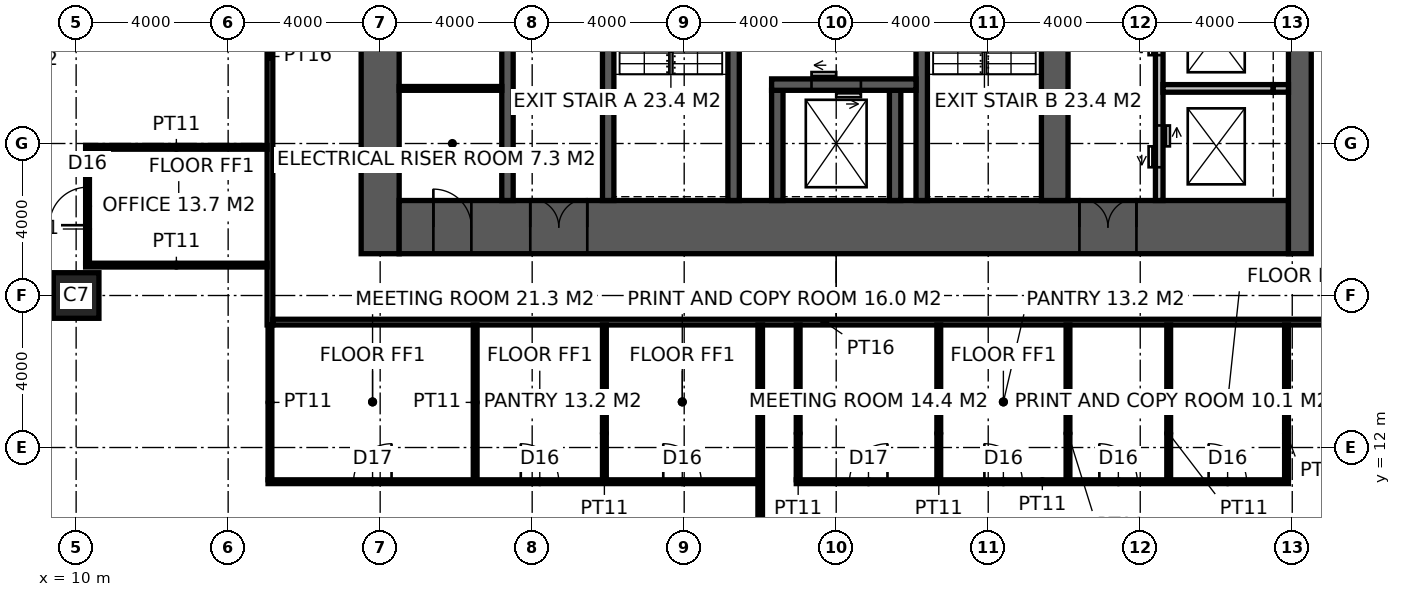
"""IFC4 building model, lengths in metres.
Left out: names, types, materials, properties, quantities, classifications, styles, units other than length and angle.
Written with IfcOpenShell. Run it as: python <this file> out.ifc"""

import sys

from ifc_helpers import new_model, si_unit, direction, frame, frame_2d, origin, origin_2d, place, context, subcontext, project, spatial, rectangle, hollow_rectangle, extrude, element, fill, save


model = new_model("IFC4")
c1 = context("Model", 3, precision=1e-05, world=origin(), true_north=direction((0.0, 1.0)))
c2 = subcontext(c1, "Body", "Model", "MODEL_VIEW")
j1 = project(units=[si_unit("LENGTHUNIT", "METRE"), si_unit("PLANEANGLEUNIT", "RADIAN")], contexts=[c1])
p1 = place(None, origin())
s1 = spatial("IfcSite", under=j1, at=p1, CompositionType="ELEMENT")
p2 = place(p1, origin())
s2 = spatial("IfcBuilding", under=s1, at=p2, CompositionType="ELEMENT")
p3 = place(p2, frame((0.0, 0.0, 47.0)))
s3 = spatial("IfcBuildingStorey", under=s2, at=p3, CompositionType="ELEMENT", Elevation=47.0)
p4 = place(p3, frame((10.0, 16.0, 0.0), z_axis=(0.0, 0.0, 1.0), x_axis=(1.0, 0.0, 0.0)))
e1 = element("IfcColumn", 1, at=p4, inside=s3, PredefinedType="COLUMN", context=c2, shape_type="SweptSolid", body=[
    extrude(hollow_rectangle(XDim=1.2, YDim=1.2, WallThickness=0.1, at=origin_2d()), origin(), (0.0, 0.0, 1.0), 4.0),
])
p5 = place(p3, frame((18.0, 17.1, -0.15), z_axis=(0.0, 0.0, 1.0), x_axis=(0.0, 1.0, 0.0)))
e2 = element("IfcWall", 2, at=p5, inside=s3, PredefinedType="SHEAR", context=c2, shape_type="SweptSolid", body=[
    extrude(rectangle(XDim=19.8, YDim=1.0, at=frame_2d((9.9, 0.0))), origin(), (0.0, 0.0, 1.0), 4.0),
])
p6 = place(p3, frame((18.5, 17.8, -0.15), z_axis=(0.0, 0.0, 1.0), x_axis=(1.0, 0.0, 0.0)))
e3 = element("IfcWall", 3, at=p6, inside=s3, PredefinedType="SHEAR", context=c2, shape_type="SweptSolid", body=[
    extrude(rectangle(XDim=23.4, YDim=1.4, at=frame_2d((11.7, 0.0))), origin(), (0.0, 0.0, 1.0), 4.0),
])
p7 = place(p6, frame((3.45, 0.0, 0.15)))
e4 = element("IfcOpeningElement", 4, at=p7, cuts=e3, PredefinedType="OPENING", context=c2, shape_type="SweptSolid", body=[
    extrude(rectangle(XDim=1.5, YDim=2.4, at=frame_2d((0.75, 1.2))), frame((0.0, 0.71, 0.0), z_axis=(0.0, -1.0, 0.0), x_axis=(1.0, 0.0, 0.0)), (0.0, 0.0, 1.0), 1.42),
])
p8 = place(p6, frame((17.9, 0.0, 0.15)))
e5 = element("IfcOpeningElement", 5, at=p8, cuts=e3, PredefinedType="OPENING", context=c2, shape_type="SweptSolid", body=[
    extrude(rectangle(XDim=1.5, YDim=2.4, at=frame_2d((0.75, 1.2))), frame((0.0, 0.71, 0.0), z_axis=(0.0, -1.0, 0.0), x_axis=(1.0, 0.0, 0.0)), (0.0, 0.0, 1.0), 1.42),
])
p9 = place(p6, frame((0.9, 0.0, 0.15)))
e6 = element("IfcOpeningElement", 6, at=p9, cuts=e3, PredefinedType="OPENING", context=c2, shape_type="SweptSolid", body=[
    extrude(rectangle(XDim=1.0, YDim=2.2, at=frame_2d((0.5, 1.1))), frame((0.0, 0.71, 0.0), z_axis=(0.0, -1.0, 0.0), x_axis=(1.0, 0.0, 0.0)), (0.0, 0.0, 1.0), 1.42),
])
p10 = place(p3, frame((42.2, 17.1, -0.15), z_axis=(0.0, 0.0, 1.0), x_axis=(0.0, 1.0, 0.0)))
e7 = element("IfcWall", 7, at=p10, inside=s3, PredefinedType="SHEAR", context=c2, shape_type="SweptSolid", body=[
    extrude(rectangle(XDim=19.8, YDim=0.6, at=frame_2d((9.9, 0.0))), origin(), (0.0, 0.0, 1.0), 4.0),
])
p11 = place(p3, frame((35.75, 18.5, -0.15), z_axis=(0.0, 0.0, 1.0), x_axis=(0.0, 1.0, 0.0)))
e8 = element("IfcWall", 8, at=p11, inside=s3, PredefinedType="SHEAR", context=c2, shape_type="SweptSolid", body=[
    extrude(rectangle(XDim=17.0, YDim=0.7, at=frame_2d((8.5, 0.0))), origin(), (0.0, 0.0, 1.0), 4.0),
])
p12 = place(p11, frame((9.85, 0.0, 0.15)))
e9 = element("IfcOpeningElement", 9, at=p12, cuts=e8, PredefinedType="OPENING", context=c2, shape_type="SweptSolid", body=[
    extrude(rectangle(XDim=1.0, YDim=2.2, at=frame_2d((0.5, 1.1))), frame((0.0, 0.36, 0.0), z_axis=(0.0, -1.0, 0.0), x_axis=(1.0, 0.0, 0.0)), (0.0, 0.0, 1.0), 0.72),
])
p13 = place(p3, frame((24.0, 18.5, -0.15), z_axis=(0.0, 0.0, 1.0), x_axis=(0.0, 1.0, 0.0)))
e10 = element("IfcWall", 10, at=p13, inside=s3, PredefinedType="SHEAR", context=c2, shape_type="SweptSolid", body=[
    extrude(rectangle(XDim=17.0, YDim=0.3, at=frame_2d((8.5, 0.0))), origin(), (0.0, 0.0, 1.0), 4.0),
])
p14 = place(p13, frame((9.6, 0.0, 0.15)))
e11 = element("IfcOpeningElement", 11, at=p14, cuts=e10, PredefinedType="OPENING", context=c2, shape_type="SweptSolid", body=[
    extrude(rectangle(XDim=1.5, YDim=2.4, at=frame_2d((0.75, 1.2))), frame((0.0, 0.16, 0.0), z_axis=(0.0, -1.0, 0.0), x_axis=(1.0, 0.0, 0.0)), (0.0, 0.0, 1.0), 0.32),
])
p15 = place(p3, frame((27.3, 18.5, -0.15), z_axis=(0.0, 0.0, 1.0), x_axis=(0.0, 1.0, 0.0)))
e12 = element("IfcWall", 12, at=p15, inside=s3, PredefinedType="SHEAR", context=c2, shape_type="SweptSolid", body=[
    extrude(rectangle(XDim=7.9, YDim=0.3, at=frame_2d((3.95, 0.0))), origin(), (0.0, 0.0, 1.0), 4.0),
])
p16 = place(p15, frame((6.4, 0.0, 0.15)))
e13 = element("IfcOpeningElement", 13, at=p16, cuts=e12, PredefinedType="OPENING", context=c2, shape_type="SweptSolid", body=[
    extrude(rectangle(XDim=1.0, YDim=2.2, at=frame_2d((0.5, 1.1))), frame((0.0, 0.16, 0.0), z_axis=(0.0, -1.0, 0.0), x_axis=(1.0, 0.0, 0.0)), (0.0, 0.0, 1.0), 0.32),
])
p17 = place(p3, frame((32.25, 18.5, -0.15), z_axis=(0.0, 0.0, 1.0), x_axis=(0.0, 1.0, 0.0)))
e14 = element("IfcWall", 14, at=p17, inside=s3, PredefinedType="SHEAR", context=c2, shape_type="SweptSolid", body=[
    extrude(rectangle(XDim=7.9, YDim=0.3, at=frame_2d((3.95, 0.0))), origin(), (0.0, 0.0, 1.0), 4.0),
])
for number, where, z_axis, x_axis in (
    (15, (28.45, 18.5, -0.15), (0.0, 0.0, 1.0), (0.0, 1.0, 0.0)),
    (16, (31.55, 18.5, -0.15), (0.0, 0.0, 1.0), (0.0, 1.0, 0.0)),
):
    element("IfcWall", number, at=place(p3, frame(where, z_axis=z_axis, x_axis=x_axis)), inside=s3, PredefinedType="SHEAR", context=c2, shape_type="SweptSolid", body=[
        extrude(rectangle(XDim=2.9, YDim=0.3, at=frame_2d((1.45, 0.0))), origin(), (0.0, 0.0, 1.0), 4.0),
    ])
p18 = place(p3, frame((28.3, 21.55, -0.15), z_axis=(0.0, 0.0, 1.0), x_axis=(1.0, 0.0, 0.0)))
e17 = element("IfcWall", 17, at=p18, inside=s3, PredefinedType="SHEAR", context=c2, shape_type="SweptSolid", body=[
    extrude(rectangle(XDim=3.8, YDim=0.3, at=frame_2d((1.9, 0.0))), origin(), (0.0, 0.0, 1.0), 4.0),
])
p19 = place(p18, frame((1.05, 0.0, 0.15)))
e18 = element("IfcOpeningElement", 18, at=p19, cuts=e17, PredefinedType="OPENING", context=c2, shape_type="SweptSolid", body=[
    extrude(rectangle(XDim=1.3, YDim=2.4, at=frame_2d((0.65, 1.2))), frame((0.0, 0.16, 0.0), z_axis=(0.0, -1.0, 0.0), x_axis=(1.0, 0.0, 0.0)), (0.0, 0.0, 1.0), 0.32),
])
p20 = place(p3, frame((21.35, 18.5, -0.15), z_axis=(0.0, 0.0, 1.0), x_axis=(0.0, 1.0, 0.0)))
e19 = element("IfcWall", 19, at=p20, inside=s3, PredefinedType="SHEAR", context=c2, shape_type="SweptSolid", body=[
    extrude(rectangle(XDim=12.5, YDim=0.3, at=frame_2d((6.25, 0.0))), origin(), (0.0, 0.0, 1.0), 4.0),
])
p21 = place(p20, frame((6.725, 0.0, 0.15)))
e20 = element("IfcOpeningElement", 20, at=p21, cuts=e19, PredefinedType="OPENING", context=c2, shape_type="SweptSolid", body=[
    extrude(rectangle(XDim=1.0, YDim=2.2, at=frame_2d((0.5, 1.1))), frame((0.0, 0.16, 0.0), z_axis=(0.0, -1.0, 0.0), x_axis=(1.0, 0.0, 0.0)), (0.0, 0.0, 1.0), 0.32),
])
p22 = place(p3, frame((38.5, 18.5, -0.15), z_axis=(0.0, 0.0, 1.0), x_axis=(0.0, 1.0, 0.0)))
e21 = element("IfcWall", 21, at=p22, inside=s3, PredefinedType="SOLIDWALL", context=c2, shape_type="SweptSolid", body=[
    extrude(rectangle(XDim=11.5, YDim=0.2, at=frame_2d((5.75, 0.0))), origin(), (0.0, 0.0, 1.0), 4.0),
])
p23 = place(p22, frame((0.875, 0.0, 0.15)))
e22 = element("IfcOpeningElement", 22, at=p23, cuts=e21, PredefinedType="OPENING", context=c2, shape_type="SweptSolid", body=[
    extrude(rectangle(XDim=1.1, YDim=2.2, at=frame_2d((0.55, 1.1))), frame((0.0, 0.11, 0.0), z_axis=(0.0, -1.0, 0.0), x_axis=(1.0, 0.0, 0.0)), (0.0, 0.0, 1.0), 0.22),
])
p24 = place(p22, frame((3.825, 0.0, 0.15)))
e23 = element("IfcOpeningElement", 23, at=p24, cuts=e21, PredefinedType="OPENING", context=c2, shape_type="SweptSolid", body=[
    extrude(rectangle(XDim=1.1, YDim=2.2, at=frame_2d((0.55, 1.1))), frame((0.0, 0.11, 0.0), z_axis=(0.0, -1.0, 0.0), x_axis=(1.0, 0.0, 0.0)), (0.0, 0.0, 1.0), 0.22),
])
p25 = place(p22, frame((6.675, 0.0, 0.15)))
e24 = element("IfcOpeningElement", 24, at=p25, cuts=e21, PredefinedType="OPENING", context=c2, shape_type="SweptSolid", body=[
    extrude(rectangle(XDim=1.1, YDim=2.2, at=frame_2d((0.55, 1.1))), frame((0.0, 0.11, 0.0), z_axis=(0.0, -1.0, 0.0), x_axis=(1.0, 0.0, 0.0)), (0.0, 0.0, 1.0), 0.22),
])
p26 = place(p22, frame((9.575, 0.0, 0.15)))
e25 = element("IfcOpeningElement", 25, at=p26, cuts=e21, PredefinedType="OPENING", context=c2, shape_type="SweptSolid", body=[
    extrude(rectangle(XDim=1.1, YDim=2.2, at=frame_2d((0.55, 1.1))), frame((0.0, 0.11, 0.0), z_axis=(0.0, -1.0, 0.0), x_axis=(1.0, 0.0, 0.0)), (0.0, 0.0, 1.0), 0.22),
])
p27 = place(p3, frame((38.6, 21.45, -0.15), z_axis=(0.0, 0.0, 1.0), x_axis=(1.0, 0.0, 0.0)))
e26 = element("IfcWall", 26, at=p27, inside=s3, PredefinedType="SOLIDWALL", context=c2, shape_type="SweptSolid", body=[
    extrude(rectangle(XDim=2.9, YDim=0.2, at=frame_2d((1.45, 0.0))), origin(), (0.0, 0.0, 1.0), 4.0),
])
p28 = place(p3, frame((41.5, 21.45, -0.15), z_axis=(0.0, 0.0, 1.0), x_axis=(1.0, 0.0, 0.0)))
e27 = element("IfcWall", 27, at=p28, inside=s3, PredefinedType="SOLIDWALL", context=c2, shape_type="SweptSolid", body=[
    extrude(rectangle(XDim=0.4, YDim=0.2, at=frame_2d((0.2, 0.0))), origin(), (0.0, 0.0, 1.0), 4.0),
])
p29 = place(p3, frame((18.5, 21.45, 0.0), z_axis=(0.0, 0.0, 1.0), x_axis=(1.0, 0.0, 0.0)))
e28 = element("IfcWall", 28, at=p29, inside=s3, PredefinedType="PARTITIONING", context=c2, shape_type="SweptSolid", body=[
    extrude(rectangle(XDim=2.7, YDim=0.1, at=frame_2d((1.35, 0.0))), origin(), (0.0, 0.0, 1.0), 3.85),
])
p30 = place(p3, frame((15.1, 15.225, 0.0), z_axis=(0.0, 0.0, 1.0), x_axis=(0.0, 1.0, 0.0)))
e29 = element("IfcWall", 29, at=p30, inside=s3, PredefinedType="PARTITIONING", context=c2, shape_type="SweptSolid", body=[
    extrude(rectangle(XDim=23.55, YDim=0.15, at=frame_2d((11.775, 0.0))), origin(), (0.0, 0.0, 1.0), 3.85),
])
p31 = place(p30, frame((10.875, 0.0, 0.0)))
e30 = element("IfcOpeningElement", 30, at=p31, cuts=e29, PredefinedType="OPENING", context=c2, shape_type="SweptSolid", body=[
    extrude(rectangle(XDim=1.8, YDim=2.4, at=frame_2d((0.9, 1.2))), frame((0.0, 0.085, 0.0), z_axis=(0.0, -1.0, 0.0), x_axis=(1.0, 0.0, 0.0)), (0.0, 0.0, 1.0), 0.17),
])
p32 = place(p3, frame((15.175, 15.3, 0.0), z_axis=(0.0, 0.0, 1.0), x_axis=(1.0, 0.0, 0.0)))
e31 = element("IfcWall", 31, at=p32, inside=s3, PredefinedType="PARTITIONING", context=c2, shape_type="SweptSolid", body=[
    extrude(rectangle(XDim=29.05, YDim=0.15, at=frame_2d((14.525, 0.0))), origin(), (0.0, 0.0, 1.0), 3.85),
])
p33 = place(p3, frame((28.0, 0.3, 0.0), z_axis=(0.0, 0.0, 1.0), x_axis=(0.0, 1.0, 0.0)))
e32 = element("IfcWall", 32, at=p33, inside=s3, PredefinedType="PARTITIONING", context=c2, shape_type="SweptSolid", body=[
    extrude(rectangle(XDim=14.925, YDim=0.12, at=frame_2d((7.462, 0.0))), origin(), (0.0, 0.0, 1.0), 3.85),
])
p34 = place(p3, frame((15.05, 11.1, 0.0), z_axis=(0.0, 0.0, 1.0), x_axis=(1.0, 0.0, 0.0)))
e33 = element("IfcWall", 33, at=p34, inside=s3, PredefinedType="PARTITIONING", context=c2, shape_type="SweptSolid", body=[
    extrude(rectangle(XDim=12.889, YDim=0.1, at=frame_2d((6.444, 0.0))), origin(), (0.0, 0.0, 1.0), 3.85),
])
p35 = place(p34, frame((2.25, 0.0, 0.0)))
e34 = element("IfcOpeningElement", 34, at=p35, cuts=e33, PredefinedType="OPENING", context=c2, shape_type="SweptSolid", body=[
    extrude(rectangle(XDim=1.0, YDim=2.2, at=frame_2d((0.5, 1.1))), frame((0.0, 0.06, 0.0), z_axis=(0.0, -1.0, 0.0), x_axis=(1.0, 0.0, 0.0)), (0.0, 0.0, 1.0), 0.12),
])
p36 = place(p34, frame((6.65, 0.0, 0.0)))
e35 = element("IfcOpeningElement", 35, at=p36, cuts=e33, PredefinedType="OPENING", context=c2, shape_type="SweptSolid", body=[
    extrude(rectangle(XDim=1.0, YDim=2.2, at=frame_2d((0.5, 1.1))), frame((0.0, 0.06, 0.0), z_axis=(0.0, -1.0, 0.0), x_axis=(1.0, 0.0, 0.0)), (0.0, 0.0, 1.0), 0.12),
])
p37 = place(p34, frame((10.399, 0.0, 0.0)))
e36 = element("IfcOpeningElement", 36, at=p37, cuts=e33, PredefinedType="OPENING", context=c2, shape_type="SweptSolid", body=[
    extrude(rectangle(XDim=1.0, YDim=2.2, at=frame_2d((0.5, 1.1))), frame((0.0, 0.06, 0.0), z_axis=(0.0, -1.0, 0.0), x_axis=(1.0, 0.0, 0.0)), (0.0, 0.0, 1.0), 0.12),
])
p38 = place(p3, frame((28.949, 11.1, 0.0), z_axis=(0.0, 0.0, 1.0), x_axis=(1.0, 0.0, 0.0)))
e37 = element("IfcWall", 37, at=p38, inside=s3, PredefinedType="PARTITIONING", context=c2, shape_type="SweptSolid", body=[
    extrude(rectangle(XDim=12.95, YDim=0.1, at=frame_2d((6.475, 0.0))), origin(), (0.0, 0.0, 1.0), 3.85),
])
p39 = place(p38, frame((1.4, 0.0, 0.0)))
e38 = element("IfcOpeningElement", 38, at=p39, cuts=e37, PredefinedType="OPENING", context=c2, shape_type="SweptSolid", body=[
    extrude(rectangle(XDim=1.0, YDim=2.2, at=frame_2d((0.5, 1.1))), frame((0.0, 0.06, 0.0), z_axis=(0.0, -1.0, 0.0), x_axis=(1.0, 0.0, 0.0)), (0.0, 0.0, 1.0), 0.12),
])
p40 = place(p38, frame((4.95, 0.0, 0.0)))
e39 = element("IfcOpeningElement", 39, at=p40, cuts=e37, PredefinedType="OPENING", context=c2, shape_type="SweptSolid", body=[
    extrude(rectangle(XDim=1.0, YDim=2.2, at=frame_2d((0.5, 1.1))), frame((0.0, 0.06, 0.0), z_axis=(0.0, -1.0, 0.0), x_axis=(1.0, 0.0, 0.0)), (0.0, 0.0, 1.0), 0.12),
])
p41 = place(p38, frame((7.975, 0.0, 0.0)))
e40 = element("IfcOpeningElement", 40, at=p41, cuts=e37, PredefinedType="OPENING", context=c2, shape_type="SweptSolid", body=[
    extrude(rectangle(XDim=1.0, YDim=2.2, at=frame_2d((0.5, 1.1))), frame((0.0, 0.06, 0.0), z_axis=(0.0, -1.0, 0.0), x_axis=(1.0, 0.0, 0.0)), (0.0, 0.0, 1.0), 0.12),
])
p42 = place(p38, frame((10.85, 0.0, 0.0)))
e41 = element("IfcOpeningElement", 41, at=p42, cuts=e37, PredefinedType="OPENING", context=c2, shape_type="SweptSolid", body=[
    extrude(rectangle(XDim=1.0, YDim=2.2, at=frame_2d((0.5, 1.1))), frame((0.0, 0.06, 0.0), z_axis=(0.0, -1.0, 0.0), x_axis=(1.0, 0.0, 0.0)), (0.0, 0.0, 1.0), 0.12),
])
p43 = place(p3, frame((10.25, 16.8, 0.0), z_axis=(0.0, 0.0, 1.0), x_axis=(1.0, 0.0, 0.0)))
e42 = element("IfcWall", 42, at=p43, inside=s3, PredefinedType="PARTITIONING", context=c2, shape_type="SweptSolid", body=[
    extrude(rectangle(XDim=4.775, YDim=0.1, at=frame_2d((2.387, 0.0))), origin(), (0.0, 0.0, 1.0), 3.85),
])
p44 = place(p3, frame((10.25, 19.9, 0.0), z_axis=(0.0, 0.0, 1.0), x_axis=(1.0, 0.0, 0.0)))
e43 = element("IfcWall", 43, at=p44, inside=s3, PredefinedType="PARTITIONING", context=c2, shape_type="SweptSolid", body=[
    extrude(rectangle(XDim=4.775, YDim=0.1, at=frame_2d((2.387, 0.0))), origin(), (0.0, 0.0, 1.0), 2.85),
])
p45 = place(p3, frame((10.3, 16.85, 0.0), z_axis=(0.0, 0.0, 1.0), x_axis=(0.0, 1.0, 0.0)))
e44 = element("IfcWall", 44, at=p45, inside=s3, PredefinedType="PARTITIONING", context=c2, shape_type="SweptSolid", body=[
    extrude(rectangle(XDim=3.0, YDim=0.1, at=frame_2d((1.5, 0.0))), origin(), (0.0, 0.0, 1.0), 2.95),
])
p46 = place(p45, frame((1.0, 0.0, 0.0)))
e45 = element("IfcOpeningElement", 45, at=p46, cuts=e44, PredefinedType="OPENING", context=c2, shape_type="SweptSolid", body=[
    extrude(rectangle(XDim=1.0, YDim=2.2, at=frame_2d((0.5, 1.1))), frame((0.0, 0.06, 0.0), z_axis=(0.0, -1.0, 0.0), x_axis=(1.0, 0.0, 0.0)), (0.0, 0.0, 1.0), 0.12),
])
for number, where, z_axis, x_axis in (
    (46, (15.1, 11.15, 0.0), (0.0, 0.0, 1.0), (0.0, 1.0, 0.0)),
    (47, (20.5, 11.15, 0.0), (0.0, 0.0, 1.0), (0.0, 1.0, 0.0)),
    (48, (23.9, 11.15, 0.0), (0.0, 0.0, 1.0), (0.0, 1.0, 0.0)),
    (49, (28.999, 11.15, 0.0), (0.0, 0.0, 1.0), (0.0, 1.0, 0.0)),
    (50, (32.699, 11.15, 0.0), (0.0, 0.0, 1.0), (0.0, 1.0, 0.0)),
    (51, (36.099, 11.15, 0.0), (0.0, 0.0, 1.0), (0.0, 1.0, 0.0)),
    (52, (38.749, 11.15, 0.0), (0.0, 0.0, 1.0), (0.0, 1.0, 0.0)),
):
    element("IfcWall", number, at=place(p3, frame(where, z_axis=z_axis, x_axis=x_axis)), inside=s3, PredefinedType="PARTITIONING", context=c2, shape_type="SweptSolid", body=[
        extrude(rectangle(XDim=4.075, YDim=0.1, at=frame_2d((2.038, 0.0))), origin(), (0.0, 0.0, 1.0), 3.85),
    ])
p47 = place(p3, frame((41.849, 11.15, 0.0), z_axis=(0.0, 0.0, 1.0), x_axis=(0.0, 1.0, 0.0)))
e53 = element("IfcWall", 53, at=p47, inside=s3, PredefinedType="PARTITIONING", context=c2, shape_type="SweptSolid", body=[
    extrude(rectangle(XDim=4.075, YDim=0.1, at=frame_2d((2.038, 0.0))), origin(), (0.0, 0.0, 1.0), 2.95),
])
p48 = place(p7, origin())
e54 = element("IfcDoor", 54, at=p48, inside=s3, OperationType="DOUBLE_DOOR_DOUBLE_SWING", PredefinedType="DOOR", context=c2, shape_type="SweptSolid", body=[
    extrude(rectangle(XDim=1.5, YDim=2.4, at=frame_2d((0.75, 1.2))), frame((0.0, 0.025, 0.0), z_axis=(0.0, -1.0, 0.0), x_axis=(1.0, 0.0, 0.0)), (0.0, 0.0, 1.0), 0.05),
])
fill(e4, e54)
p49 = place(p8, origin())
e55 = element("IfcDoor", 55, at=p49, inside=s3, OperationType="DOUBLE_DOOR_DOUBLE_SWING", PredefinedType="DOOR", context=c2, shape_type="SweptSolid", body=[
    extrude(rectangle(XDim=1.5, YDim=2.4, at=frame_2d((0.75, 1.2))), frame((0.0, 0.025, 0.0), z_axis=(0.0, -1.0, 0.0), x_axis=(1.0, 0.0, 0.0)), (0.0, 0.0, 1.0), 0.05),
])
fill(e5, e55)
p50 = place(p9, origin())
e56 = element("IfcDoor", 56, at=p50, inside=s3, OperationType="SINGLE_SWING_LEFT", PredefinedType="DOOR", context=c2, shape_type="SweptSolid", body=[
    extrude(rectangle(XDim=1.0, YDim=2.2, at=frame_2d((0.5, 1.1))), frame((0.0, 0.025, 0.0), z_axis=(0.0, -1.0, 0.0), x_axis=(1.0, 0.0, 0.0)), (0.0, 0.0, 1.0), 0.05),
])
fill(e6, e56)
p51 = place(p35, origin())
e57 = element("IfcDoor", 57, at=p51, inside=s3, OperationType="SINGLE_SWING_RIGHT", PredefinedType="DOOR", context=c2, shape_type="SweptSolid", body=[
    extrude(rectangle(XDim=1.0, YDim=2.2, at=frame_2d((0.5, 1.1))), frame((0.0, 0.025, 0.0), z_axis=(0.0, -1.0, 0.0), x_axis=(1.0, 0.0, 0.0)), (0.0, 0.0, 1.0), 0.05),
])
fill(e34, e57)
p52 = place(p36, origin())
e58 = element("IfcDoor", 58, at=p52, inside=s3, OperationType="SINGLE_SWING_LEFT", PredefinedType="DOOR", context=c2, shape_type="SweptSolid", body=[
    extrude(rectangle(XDim=1.0, YDim=2.2, at=frame_2d((0.5, 1.1))), frame((0.0, 0.025, 0.0), z_axis=(0.0, -1.0, 0.0), x_axis=(1.0, 0.0, 0.0)), (0.0, 0.0, 1.0), 0.05),
])
fill(e35, e58)
p53 = place(p37, origin())
e59 = element("IfcDoor", 59, at=p53, inside=s3, OperationType="SINGLE_SWING_LEFT", PredefinedType="DOOR", context=c2, shape_type="SweptSolid", body=[
    extrude(rectangle(XDim=1.0, YDim=2.2, at=frame_2d((0.5, 1.1))), frame((0.0, 0.025, 0.0), z_axis=(0.0, -1.0, 0.0), x_axis=(1.0, 0.0, 0.0)), (0.0, 0.0, 1.0), 0.05),
])
fill(e36, e59)
p54 = place(p39, origin())
e60 = element("IfcDoor", 60, at=p54, inside=s3, OperationType="SINGLE_SWING_RIGHT", PredefinedType="DOOR", context=c2, shape_type="SweptSolid", body=[
    extrude(rectangle(XDim=1.0, YDim=2.2, at=frame_2d((0.5, 1.1))), frame((0.0, 0.025, 0.0), z_axis=(0.0, -1.0, 0.0), x_axis=(1.0, 0.0, 0.0)), (0.0, 0.0, 1.0), 0.05),
])
fill(e38, e60)
p55 = place(p40, origin())
e61 = element("IfcDoor", 61, at=p55, inside=s3, OperationType="SINGLE_SWING_LEFT", PredefinedType="DOOR", context=c2, shape_type="SweptSolid", body=[
    extrude(rectangle(XDim=1.0, YDim=2.2, at=frame_2d((0.5, 1.1))), frame((0.0, 0.025, 0.0), z_axis=(0.0, -1.0, 0.0), x_axis=(1.0, 0.0, 0.0)), (0.0, 0.0, 1.0), 0.05),
])
fill(e39, e61)
p56 = place(p41, origin())
e62 = element("IfcDoor", 62, at=p56, inside=s3, OperationType="SINGLE_SWING_LEFT", PredefinedType="DOOR", context=c2, shape_type="SweptSolid", body=[
    extrude(rectangle(XDim=1.0, YDim=2.2, at=frame_2d((0.5, 1.1))), frame((0.0, 0.025, 0.0), z_axis=(0.0, -1.0, 0.0), x_axis=(1.0, 0.0, 0.0)), (0.0, 0.0, 1.0), 0.05),
])
fill(e40, e62)
p57 = place(p42, origin())
e63 = element("IfcDoor", 63, at=p57, inside=s3, OperationType="SINGLE_SWING_LEFT", PredefinedType="DOOR", context=c2, shape_type="SweptSolid", body=[
    extrude(rectangle(XDim=1.0, YDim=2.2, at=frame_2d((0.5, 1.1))), frame((0.0, 0.025, 0.0), z_axis=(0.0, -1.0, 0.0), x_axis=(1.0, 0.0, 0.0)), (0.0, 0.0, 1.0), 0.05),
])
fill(e41, e63)
p58 = place(p46, origin())
e64 = element("IfcDoor", 64, at=p58, inside=s3, OperationType="SINGLE_SWING_LEFT", PredefinedType="DOOR", context=c2, shape_type="SweptSolid", body=[
    extrude(rectangle(XDim=1.0, YDim=2.2, at=frame_2d((0.5, 1.1))), frame((0.0, 0.025, 0.0), z_axis=(0.0, -1.0, 0.0), x_axis=(1.0, 0.0, 0.0)), (0.0, 0.0, 1.0), 0.05),
])
fill(e45, e64)
p59 = place(p19, origin())
e65 = element("IfcDoor", 65, at=p59, inside=s3, OperationType="DOUBLE_DOOR_SLIDING", PredefinedType="DOOR", context=c2, shape_type="SweptSolid", body=[
    extrude(rectangle(XDim=1.3, YDim=2.4, at=frame_2d((0.65, 1.2))), frame((0.0, 0.025, 0.0), z_axis=(0.0, -1.0, 0.0), x_axis=(1.0, 0.0, 0.0)), (0.0, 0.0, 1.0), 0.05),
])
fill(e18, e65)
p60 = place(p23, origin())
e66 = element("IfcDoor", 66, at=p60, inside=s3, OperationType="DOUBLE_DOOR_SLIDING", PredefinedType="DOOR", context=c2, shape_type="SweptSolid", body=[
    extrude(rectangle(XDim=1.1, YDim=2.2, at=frame_2d((0.55, 1.1))), frame((0.0, 0.025, 0.0), z_axis=(0.0, -1.0, 0.0), x_axis=(1.0, 0.0, 0.0)), (0.0, 0.0, 1.0), 0.05),
])
fill(e22, e66)
p61 = place(p24, origin())
e67 = element("IfcDoor", 67, at=p61, inside=s3, OperationType="DOUBLE_DOOR_SLIDING", PredefinedType="DOOR", context=c2, shape_type="SweptSolid", body=[
    extrude(rectangle(XDim=1.1, YDim=2.2, at=frame_2d((0.55, 1.1))), frame((0.0, 0.025, 0.0), z_axis=(0.0, -1.0, 0.0), x_axis=(1.0, 0.0, 0.0)), (0.0, 0.0, 1.0), 0.05),
])
fill(e23, e67)
save(model, sys.argv[1])
